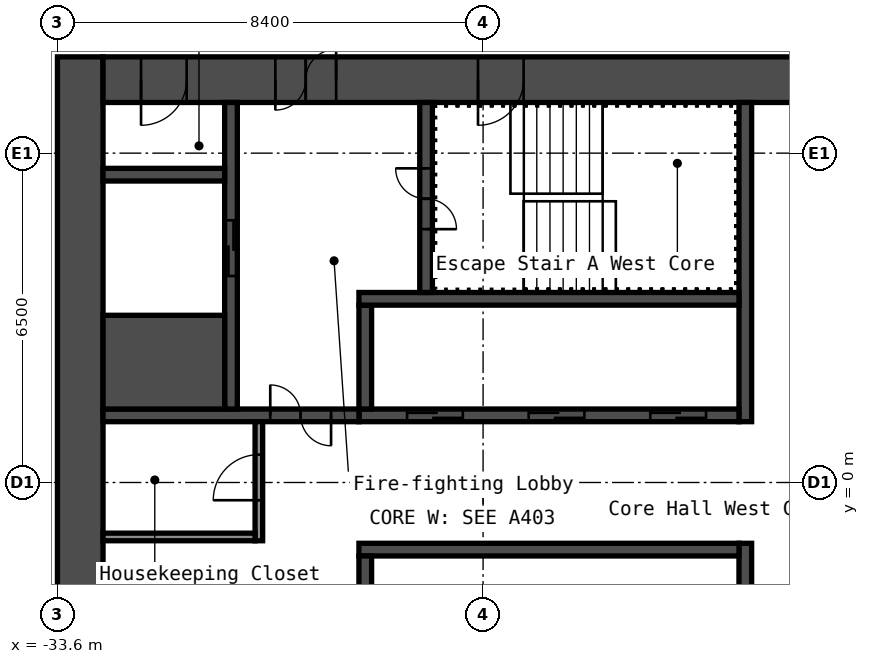
"""IFC4 building model, lengths in metres.
Left out: names, types, materials, properties, quantities, classifications, styles, units other than length and angle.
Written with IfcOpenShell. Run it as: python <this file> out.ifc"""

import sys

from ifc_helpers import new_model, si_unit, direction, frame, frame_2d, origin, place, context, subcontext, project, spatial, rectangle, extrude, element, fill, save


model = new_model("IFC4")
c1 = context("Model", 3, precision=1e-05, world=origin(), true_north=direction((0.0, 1.0)))
c2 = subcontext(c1, "Body", "Model", "MODEL_VIEW")
j1 = project(units=[si_unit("LENGTHUNIT", "METRE"), si_unit("PLANEANGLEUNIT", "RADIAN")], contexts=[c1])
p1 = place(None, origin())
s1 = spatial("IfcSite", under=j1, at=p1, CompositionType="ELEMENT")
p2 = place(p1, origin())
s2 = spatial("IfcBuilding", under=s1, at=p2, CompositionType="ELEMENT")
p3 = place(p2, frame((0.0, 0.0, 15.0)))
s3 = spatial("IfcBuildingStorey", under=s2, at=p3, CompositionType="ELEMENT", Elevation=15.0)
p4 = place(p3, frame((-33.15, -8.4, 0.0), z_axis=(0.0, 0.0, 1.0), x_axis=(0.0, 1.0, 0.0)))
e1 = element("IfcWall", 1, at=p4, inside=s3, PredefinedType="SHEAR", context=c2, shape_type="SweptSolid", body=[
    extrude(rectangle(XDim=16.8, YDim=0.9, at=frame_2d((8.4, 0.0))), origin(), (0.0, 0.0, 1.0), 4.4),
])
p5 = place(p3, frame((-32.7, 7.95, 0.0), z_axis=(0.0, 0.0, 1.0), x_axis=(1.0, 0.0, 0.0)))
e2 = element("IfcWall", 2, at=p5, inside=s3, PredefinedType="SHEAR", context=c2, shape_type="SweptSolid", body=[
    extrude(rectangle(XDim=15.0, YDim=0.9, at=frame_2d((7.5, 0.0))), origin(), (0.0, 0.0, 1.0), 4.4),
])
p6 = place(p5, frame((3.4, 0.0, 0.0)))
e3 = element("IfcOpeningElement", 3, at=p6, cuts=e2, PredefinedType="OPENING", context=c2, shape_type="SweptSolid", body=[
    extrude(rectangle(XDim=1.2, YDim=2.1, at=frame_2d((0.6, 1.05))), frame((0.0, 0.46, 0.0), z_axis=(0.0, -1.0, 0.0), x_axis=(1.0, 0.0, 0.0)), (0.0, 0.0, 1.0), 0.92),
])
p7 = place(p5, frame((0.75, 0.0, 0.0)))
e4 = element("IfcOpeningElement", 4, at=p7, cuts=e2, PredefinedType="OPENING", context=c2, shape_type="SweptSolid", body=[
    extrude(rectangle(XDim=0.9, YDim=2.1, at=frame_2d((0.45, 1.05))), frame((0.0, 0.46, 0.0), z_axis=(0.0, -1.0, 0.0), x_axis=(1.0, 0.0, 0.0)), (0.0, 0.0, 1.0), 0.92),
])
p8 = place(p5, frame((7.4, 0.0, 0.0)))
e5 = element("IfcOpeningElement", 5, at=p8, cuts=e2, PredefinedType="OPENING", context=c2, shape_type="SweptSolid", body=[
    extrude(rectangle(XDim=0.9, YDim=2.1, at=frame_2d((0.45, 1.05))), frame((0.0, 0.46, 0.0), z_axis=(0.0, -1.0, 0.0), x_axis=(1.0, 0.0, 0.0)), (0.0, 0.0, 1.0), 0.92),
])
p9 = place(p3, frame((-20.025, 1.2, 0.0), z_axis=(0.0, 0.0, 1.0), x_axis=(0.0, 1.0, 0.0)))
e6 = element("IfcWall", 6, at=p9, inside=s3, PredefinedType="SHEAR", context=c2, shape_type="SweptSolid", body=[
    extrude(rectangle(XDim=6.3, YDim=0.25, at=frame_2d((3.15, 0.0))), origin(), (0.0, 0.0, 1.0), 4.4),
])
p10 = place(p3, frame((-20.025, -7.5, 0.0), z_axis=(0.0, 0.0, 1.0), x_axis=(0.0, 1.0, 0.0)))
e7 = element("IfcWall", 7, at=p10, inside=s3, PredefinedType="SHEAR", context=c2, shape_type="SweptSolid", body=[
    extrude(rectangle(XDim=6.3, YDim=0.25, at=frame_2d((3.15, 0.0))), origin(), (0.0, 0.0, 1.0), 4.4),
])
p11 = place(p10, frame((2.4, 0.0, 0.0)))
e8 = element("IfcOpeningElement", 8, at=p11, cuts=e7, PredefinedType="OPENING", context=c2, shape_type="SweptSolid", body=[
    extrude(rectangle(XDim=1.0, YDim=2.1, at=frame_2d((0.5, 1.05))), frame((0.0, 0.135, 0.0), z_axis=(0.0, -1.0, 0.0), x_axis=(1.0, 0.0, 0.0)), (0.0, 0.0, 1.0), 0.27),
])
p12 = place(p3, frame((-27.65, 1.325, 0.0), z_axis=(0.0, 0.0, 1.0), x_axis=(1.0, 0.0, 0.0)))
e9 = element("IfcWall", 9, at=p12, inside=s3, PredefinedType="SHEAR", context=c2, shape_type="SweptSolid", body=[
    extrude(rectangle(XDim=7.5, YDim=0.25, at=frame_2d((3.75, 0.0))), origin(), (0.0, 0.0, 1.0), 4.4),
])
p13 = place(p12, frame((5.75, 0.0, 0.0)))
e10 = element("IfcOpeningElement", 10, at=p13, cuts=e9, PredefinedType="OPENING", context=c2, shape_type="SweptSolid", body=[
    extrude(rectangle(XDim=1.1, YDim=2.1, at=frame_2d((0.55, 1.05))), frame((0.0, 0.135, 0.0), z_axis=(0.0, -1.0, 0.0), x_axis=(1.0, 0.0, 0.0)), (0.0, 0.0, 1.0), 0.27),
])
p14 = place(p12, frame((3.35, 0.0, 0.0)))
e11 = element("IfcOpeningElement", 11, at=p14, cuts=e9, PredefinedType="OPENING", context=c2, shape_type="SweptSolid", body=[
    extrude(rectangle(XDim=1.1, YDim=2.1, at=frame_2d((0.55, 1.05))), frame((0.0, 0.135, 0.0), z_axis=(0.0, -1.0, 0.0), x_axis=(1.0, 0.0, 0.0)), (0.0, 0.0, 1.0), 0.27),
])
p15 = place(p12, frame((0.95, 0.0, 0.0)))
e12 = element("IfcOpeningElement", 12, at=p15, cuts=e9, PredefinedType="OPENING", context=c2, shape_type="SweptSolid", body=[
    extrude(rectangle(XDim=1.1, YDim=2.1, at=frame_2d((0.55, 1.05))), frame((0.0, 0.135, 0.0), z_axis=(0.0, -1.0, 0.0), x_axis=(1.0, 0.0, 0.0)), (0.0, 0.0, 1.0), 0.27),
])
p16 = place(p3, frame((-27.525, 1.45, 0.0), z_axis=(0.0, 0.0, 1.0), x_axis=(0.0, 1.0, 0.0)))
e13 = element("IfcWall", 13, at=p16, inside=s3, PredefinedType="SHEAR", context=c2, shape_type="SweptSolid", body=[
    extrude(rectangle(XDim=2.05, YDim=0.25, at=frame_2d((1.025, 0.0))), origin(), (0.0, 0.0, 1.0), 4.4),
])
p17 = place(p3, frame((-27.65, 3.625, 0.0), z_axis=(0.0, 0.0, 1.0), x_axis=(1.0, 0.0, 0.0)))
e14 = element("IfcWall", 14, at=p17, inside=s3, PredefinedType="SHEAR", context=c2, shape_type="SweptSolid", body=[
    extrude(rectangle(XDim=7.5, YDim=0.25, at=frame_2d((3.75, 0.0))), origin(), (0.0, 0.0, 1.0), 4.4),
])
p18 = place(p3, frame((-26.325, 3.75, 0.0), z_axis=(0.0, 0.0, 1.0), x_axis=(0.0, 1.0, 0.0)))
e15 = element("IfcWall", 15, at=p18, inside=s3, PredefinedType="SHEAR", context=c2, shape_type="SweptSolid", body=[
    extrude(rectangle(XDim=3.75, YDim=0.25, at=frame_2d((1.875, 0.0))), origin(), (0.0, 0.0, 1.0), 4.4),
])
p19 = place(p18, frame((1.25, 0.0, 0.0)))
e16 = element("IfcOpeningElement", 16, at=p19, cuts=e15, PredefinedType="OPENING", context=c2, shape_type="SweptSolid", body=[
    extrude(rectangle(XDim=1.2, YDim=2.1, at=frame_2d((0.6, 1.05))), frame((0.0, 0.135, 0.0), z_axis=(0.0, -1.0, 0.0), x_axis=(1.0, 0.0, 0.0)), (0.0, 0.0, 1.0), 0.27),
])
p20 = place(p3, frame((-32.7, 1.325, 0.0), z_axis=(0.0, 0.0, 1.0), x_axis=(1.0, 0.0, 0.0)))
e17 = element("IfcWall", 17, at=p20, inside=s3, PredefinedType="SHEAR", context=c2, shape_type="SweptSolid", body=[
    extrude(rectangle(XDim=5.05, YDim=0.25, at=frame_2d((2.525, 0.0))), origin(), (0.0, 0.0, 1.0), 4.4),
])
p21 = place(p20, frame((3.3, 0.0, 0.0)))
e18 = element("IfcOpeningElement", 18, at=p21, cuts=e17, PredefinedType="OPENING", context=c2, shape_type="SweptSolid", body=[
    extrude(rectangle(XDim=1.2, YDim=2.1, at=frame_2d((0.6, 1.05))), frame((0.0, 0.135, 0.0), z_axis=(0.0, -1.0, 0.0), x_axis=(1.0, 0.0, 0.0)), (0.0, 0.0, 1.0), 0.27),
])
p22 = place(p3, frame((-30.175, 1.45, 0.0), z_axis=(0.0, 0.0, 1.0), x_axis=(0.0, 1.0, 0.0)))
e19 = element("IfcWall", 19, at=p22, inside=s3, PredefinedType="SHEAR", context=c2, shape_type="SweptSolid", body=[
    extrude(rectangle(XDim=6.05, YDim=0.25, at=frame_2d((3.025, 0.0))), origin(), (0.0, 0.0, 1.0), 4.4),
])
p23 = place(p22, frame((2.625, 0.0, 0.0)))
e20 = element("IfcOpeningElement", 20, at=p23, cuts=e19, PredefinedType="OPENING", context=c2, shape_type="SweptSolid", body=[
    extrude(rectangle(XDim=1.1, YDim=2.1, at=frame_2d((0.55, 1.05))), frame((0.0, 0.135, 0.0), z_axis=(0.0, -1.0, 0.0), x_axis=(1.0, 0.0, 0.0)), (0.0, 0.0, 1.0), 0.27),
])
p24 = place(p3, frame((-32.7, 2.375, 0.0), z_axis=(0.0, 0.0, 1.0), x_axis=(1.0, 0.0, 0.0)))
e21 = element("IfcWall", 21, at=p24, inside=s3, PredefinedType="SHEAR", context=c2, shape_type="SweptSolid", body=[
    extrude(rectangle(XDim=2.4, YDim=1.85, at=frame_2d((1.2, 0.0))), origin(), (0.0, 0.0, 1.0), 4.4),
])
p25 = place(p3, frame((-32.7, 6.075, 0.0), z_axis=(0.0, 0.0, 1.0), x_axis=(1.0, 0.0, 0.0)))
e22 = element("IfcWall", 22, at=p25, inside=s3, PredefinedType="SHEAR", context=c2, shape_type="SweptSolid", body=[
    extrude(rectangle(XDim=2.4, YDim=0.25, at=frame_2d((1.2, 0.0))), origin(), (0.0, 0.0, 1.0), 4.4),
])
p26 = place(p3, frame((-27.65, -1.325, 0.0), z_axis=(0.0, 0.0, 1.0), x_axis=(1.0, 0.0, 0.0)))
e23 = element("IfcWall", 23, at=p26, inside=s3, PredefinedType="SHEAR", context=c2, shape_type="SweptSolid", body=[
    extrude(rectangle(XDim=7.5, YDim=0.25, at=frame_2d((3.75, 0.0))), origin(), (0.0, 0.0, 1.0), 4.4),
])
p27 = place(p3, frame((-27.525, -3.5, 0.0), z_axis=(0.0, 0.0, 1.0), x_axis=(0.0, 1.0, 0.0)))
e24 = element("IfcWall", 24, at=p27, inside=s3, PredefinedType="SHEAR", context=c2, shape_type="SweptSolid", body=[
    extrude(rectangle(XDim=2.05, YDim=0.25, at=frame_2d((1.025, 0.0))), origin(), (0.0, 0.0, 1.0), 4.4),
])
p28 = place(p3, frame((-29.625, -1.15, 0.0), z_axis=(0.0, 0.0, 1.0), x_axis=(0.0, 1.0, 0.0)))
e25 = element("IfcWall", 25, at=p28, inside=s3, PredefinedType="PARTITIONING", context=c2, shape_type="SweptSolid", body=[
    extrude(rectangle(XDim=2.35, YDim=0.15, at=frame_2d((1.175, 0.0))), origin(), (0.0, 0.0, 1.0), 4.4),
])
p29 = place(p28, frame((0.8, 0.0, 0.0)))
e26 = element("IfcOpeningElement", 26, at=p29, cuts=e25, PredefinedType="OPENING", context=c2, shape_type="SweptSolid", body=[
    extrude(rectangle(XDim=0.9, YDim=2.1, at=frame_2d((0.45, 1.05))), frame((0.0, 0.085, 0.0), z_axis=(0.0, -1.0, 0.0), x_axis=(1.0, 0.0, 0.0)), (0.0, 0.0, 1.0), 0.17),
])
p30 = place(p3, frame((-32.7, -1.075, 0.0), z_axis=(0.0, 0.0, 1.0), x_axis=(1.0, 0.0, 0.0)))
e27 = element("IfcWall", 27, at=p30, inside=s3, PredefinedType="PARTITIONING", context=c2, shape_type="SweptSolid", body=[
    extrude(rectangle(XDim=3.0, YDim=0.15, at=frame_2d((1.5, 0.0))), origin(), (0.0, 0.0, 1.0), 4.4),
])
p31 = place(p6, origin())
e28 = element("IfcDoor", 28, at=p31, inside=s3, OperationType="DOUBLE_DOOR_SINGLE_SWING", PredefinedType="DOOR", context=c2, shape_type="SweptSolid", body=[
    extrude(rectangle(XDim=1.2, YDim=2.1, at=frame_2d((0.6, 1.05))), frame((0.0, 0.025, 0.0), z_axis=(0.0, -1.0, 0.0), x_axis=(1.0, 0.0, 0.0)), (0.0, 0.0, 1.0), 0.05),
])
fill(e3, e28)
p32 = place(p7, origin())
e29 = element("IfcDoor", 29, at=p32, inside=s3, OperationType="SINGLE_SWING_LEFT", PredefinedType="DOOR", context=c2, shape_type="SweptSolid", body=[
    extrude(rectangle(XDim=0.9, YDim=2.1, at=frame_2d((0.45, 1.05))), frame((0.0, 0.025, 0.0), z_axis=(0.0, -1.0, 0.0), x_axis=(1.0, 0.0, 0.0)), (0.0, 0.0, 1.0), 0.05),
])
fill(e4, e29)
p33 = place(p8, origin())
e30 = element("IfcDoor", 30, at=p33, inside=s3, OperationType="SINGLE_SWING_LEFT", PredefinedType="DOOR", context=c2, shape_type="SweptSolid", body=[
    extrude(rectangle(XDim=0.9, YDim=2.1, at=frame_2d((0.45, 1.05))), frame((0.0, 0.025, 0.0), z_axis=(0.0, -1.0, 0.0), x_axis=(1.0, 0.0, 0.0)), (0.0, 0.0, 1.0), 0.05),
])
fill(e5, e30)
p34 = place(p19, origin())
e31 = element("IfcDoor", 31, at=p34, inside=s3, OperationType="DOUBLE_DOOR_SINGLE_SWING", PredefinedType="DOOR", context=c2, shape_type="SweptSolid", body=[
    extrude(rectangle(XDim=1.2, YDim=2.1, at=frame_2d((0.6, 1.05))), frame((0.0, 0.025, 0.0), z_axis=(0.0, -1.0, 0.0), x_axis=(1.0, 0.0, 0.0)), (0.0, 0.0, 1.0), 0.05),
])
fill(e16, e31)
p35 = place(p21, origin())
e32 = element("IfcDoor", 32, at=p35, inside=s3, OperationType="DOUBLE_DOOR_SINGLE_SWING", PredefinedType="DOOR", context=c2, shape_type="SweptSolid", body=[
    extrude(rectangle(XDim=1.2, YDim=2.1, at=frame_2d((0.6, 1.05))), frame((0.0, 0.025, 0.0), z_axis=(0.0, -1.0, 0.0), x_axis=(1.0, 0.0, 0.0)), (0.0, 0.0, 1.0), 0.05),
])
fill(e18, e32)
p36 = place(p29, origin())
e33 = element("IfcDoor", 33, at=p36, inside=s3, OperationType="SINGLE_SWING_RIGHT", PredefinedType="DOOR", context=c2, shape_type="SweptSolid", body=[
    extrude(rectangle(XDim=0.9, YDim=2.1, at=frame_2d((0.45, 1.05))), frame((0.0, 0.025, 0.0), z_axis=(0.0, -1.0, 0.0), x_axis=(1.0, 0.0, 0.0)), (0.0, 0.0, 1.0), 0.05),
])
fill(e26, e33)
p37 = place(p13, origin())
e34 = element("IfcDoor", 34, at=p37, inside=s3, OperationType="DOUBLE_DOOR_SLIDING", PredefinedType="DOOR", context=c2, shape_type="SweptSolid", body=[
    extrude(rectangle(XDim=1.1, YDim=2.1, at=frame_2d((0.55, 1.05))), frame((0.0, 0.025, 0.0), z_axis=(0.0, -1.0, 0.0), x_axis=(1.0, 0.0, 0.0)), (0.0, 0.0, 1.0), 0.05),
])
fill(e10, e34)
p38 = place(p14, origin())
e35 = element("IfcDoor", 35, at=p38, inside=s3, OperationType="DOUBLE_DOOR_SLIDING", PredefinedType="DOOR", context=c2, shape_type="SweptSolid", body=[
    extrude(rectangle(XDim=1.1, YDim=2.1, at=frame_2d((0.55, 1.05))), frame((0.0, 0.025, 0.0), z_axis=(0.0, -1.0, 0.0), x_axis=(1.0, 0.0, 0.0)), (0.0, 0.0, 1.0), 0.05),
])
fill(e11, e35)
p39 = place(p15, origin())
e36 = element("IfcDoor", 36, at=p39, inside=s3, OperationType="DOUBLE_DOOR_SLIDING", PredefinedType="DOOR", context=c2, shape_type="SweptSolid", body=[
    extrude(rectangle(XDim=1.1, YDim=2.1, at=frame_2d((0.55, 1.05))), frame((0.0, 0.025, 0.0), z_axis=(0.0, -1.0, 0.0), x_axis=(1.0, 0.0, 0.0)), (0.0, 0.0, 1.0), 0.05),
])
fill(e12, e36)
p40 = place(p23, origin())
e37 = element("IfcDoor", 37, at=p40, inside=s3, OperationType="DOUBLE_DOOR_SLIDING", PredefinedType="DOOR", context=c2, shape_type="SweptSolid", body=[
    extrude(rectangle(XDim=1.1, YDim=2.1, at=frame_2d((0.55, 1.05))), frame((0.0, 0.025, 0.0), z_axis=(0.0, -1.0, 0.0), x_axis=(1.0, 0.0, 0.0)), (0.0, 0.0, 1.0), 0.05),
])
fill(e20, e37)
save(model, sys.argv[1])
